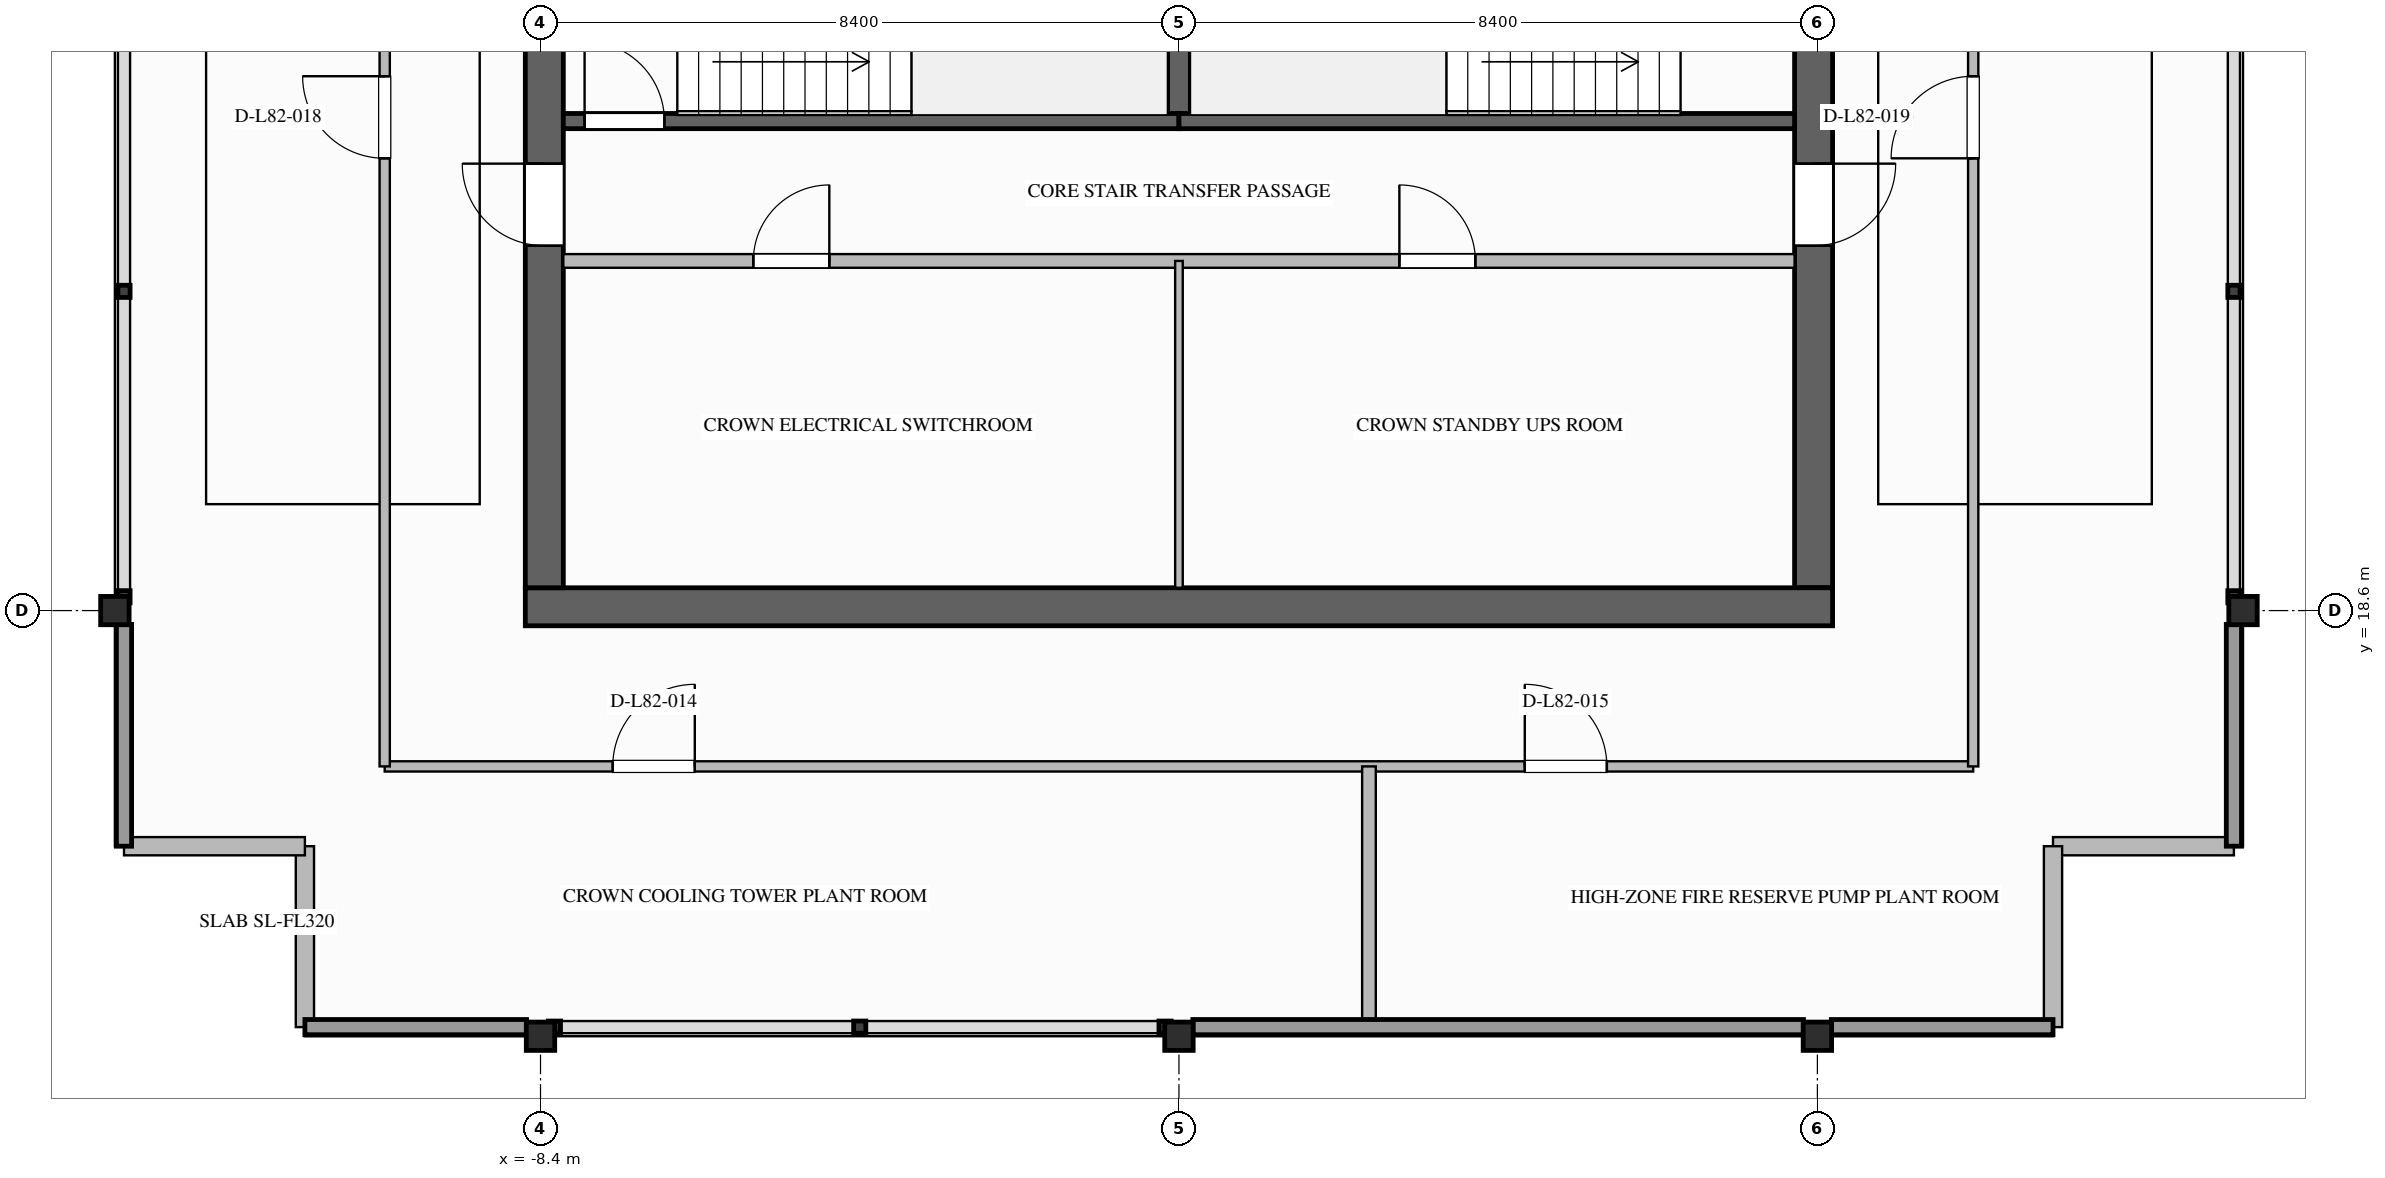
"""IFC4 building model, lengths in metres.
Left out: names, types, materials, properties, quantities, classifications, styles, units other than length and angle.
Written with IfcOpenShell. Run it as: python <this file> out.ifc"""

import sys

from ifc_helpers import new_model, si_unit, direction, frame, frame_2d, origin, origin_2d, place, context, subcontext, project, spatial, rectangle, i_section, extrude, element, fill, save


model = new_model("IFC4")
c1 = context("Model", 3, precision=1e-05, world=origin(), true_north=direction((0.0, 1.0)))
c2 = subcontext(c1, "Body", "Model", "MODEL_VIEW")
j1 = project(units=[si_unit("LENGTHUNIT", "METRE"), si_unit("PLANEANGLEUNIT", "RADIAN")], contexts=[c1])
p1 = place(None, origin())
s1 = spatial("IfcSite", under=j1, at=p1, CompositionType="ELEMENT")
p2 = place(p1, origin())
s2 = spatial("IfcBuilding", under=s1, at=p2, CompositionType="ELEMENT")
p3 = place(p2, frame((0.0, 0.0, 315.4)))
s3 = spatial("IfcBuildingStorey", under=s2, at=p3, CompositionType="ELEMENT", Elevation=315.4)
p4 = place(p3, frame((8.35, 35.1, 0.0), z_axis=(0.0, 0.0, 1.0), x_axis=(0.0, -1.0, 0.0)))
e1 = element("IfcWall", 1, at=p4, inside=s3, PredefinedType="SHEAR", context=c2, shape_type="SweptSolid", body=[
    extrude(rectangle(XDim=16.2, YDim=0.5, at=frame_2d((8.1, 0.0))), origin(), (0.0, 0.0, 1.0), 4.0),
])
p5 = place(p4, frame((3.08, 0.0, 0.0)))
e2 = element("IfcOpeningElement", 2, at=p5, cuts=e1, PredefinedType="OPENING", context=c2, shape_type="SweptSolid", body=[
    extrude(rectangle(XDim=1.12, YDim=2.1, at=frame_2d((0.56, 1.05))), frame((0.0, 0.26, 0.0), z_axis=(0.0, -1.0, 0.0), x_axis=(1.0, 0.0, 0.0)), (0.0, 0.0, 1.0), 0.52),
])
p6 = place(p4, frame((10.62, 0.0, 0.0)))
e3 = element("IfcOpeningElement", 3, at=p6, cuts=e1, PredefinedType="OPENING", context=c2, shape_type="SweptSolid", body=[
    extrude(rectangle(XDim=1.08, YDim=2.04, at=frame_2d((0.54, 1.02))), frame((0.0, 0.26, 0.0), z_axis=(0.0, -1.0, 0.0), x_axis=(1.0, 0.0, 0.0)), (0.0, 0.0, 1.0), 0.52),
])
p7 = place(p3, frame((8.6, 18.65, 0.0), z_axis=(0.0, 0.0, 1.0), x_axis=(-1.0, 0.0, 0.0)))
e4 = element("IfcWall", 4, at=p7, inside=s3, PredefinedType="SHEAR", context=c2, shape_type="SweptSolid", body=[
    extrude(rectangle(XDim=17.2, YDim=0.5, at=frame_2d((8.6, 0.0))), origin(), (0.0, 0.0, 1.0), 4.0),
])
p8 = place(p3, frame((-8.35, 18.9, 0.0), z_axis=(0.0, 0.0, 1.0), x_axis=(0.0, 1.0, 0.0)))
e5 = element("IfcWall", 5, at=p8, inside=s3, PredefinedType="SHEAR", context=c2, shape_type="SweptSolid", body=[
    extrude(rectangle(XDim=16.2, YDim=0.5, at=frame_2d((8.1, 0.0))), origin(), (0.0, 0.0, 1.0), 4.0),
])
p9 = place(p8, frame((4.5, 0.0, 0.0)))
e6 = element("IfcOpeningElement", 6, at=p9, cuts=e5, PredefinedType="OPENING", context=c2, shape_type="SweptSolid", body=[
    extrude(rectangle(XDim=1.08, YDim=2.04, at=frame_2d((0.54, 1.02))), frame((0.0, 0.26, 0.0), z_axis=(0.0, -1.0, 0.0), x_axis=(1.0, 0.0, 0.0)), (0.0, 0.0, 1.0), 0.52),
])
for number, where, z_axis, x_axis in (
    (7, (-14.0, 18.6, 0.0), (0.0, 0.0, 1.0), (1.0, 0.0, 0.0)),
    (8, (14.0, 18.6, 0.0), (0.0, 0.0, 1.0), (1.0, 0.0, 0.0)),
    (9, (-8.4, 13.0, 0.0), (0.0, 0.0, 1.0), (1.0, 0.0, 0.0)),
    (10, (0.0, 13.0, 0.0), (0.0, 0.0, 1.0), (1.0, 0.0, 0.0)),
    (11, (8.4, 13.0, 0.0), (0.0, 0.0, 1.0), (1.0, 0.0, 0.0)),
):
    element("IfcColumn", number, at=place(p3, frame(where, z_axis=z_axis, x_axis=x_axis)), inside=s3, PredefinedType="COLUMN", context=c2, shape_type="SweptSolid", body=[
        extrude(i_section(OverallWidth=0.374, OverallDepth=0.372, WebThickness=0.016, FlangeThickness=0.026, FilletRadius=0.025, at=origin_2d()), origin(), (0.0, 0.0, 1.0), 3.997),
    ])
for number, where, z_axis, x_axis in (
    (12, (-11.5, 13.12, 0.0), (0.0, 0.0, 1.0), (0.0, 1.0, 0.0)),
    (13, (-11.5, 15.5, 0.0), (0.0, 0.0, 1.0), (-1.0, 0.0, 0.0)),
    (14, (13.88, 15.5, 0.0), (0.0, 0.0, 1.0), (-1.0, 0.0, 0.0)),
    (15, (11.5, 15.5, 0.0), (0.0, 0.0, 1.0), (0.0, -1.0, 0.0)),
):
    element("IfcWall", number, at=place(p3, frame(where, z_axis=z_axis, x_axis=x_axis)), inside=s3, PredefinedType="STANDARD", context=c2, shape_type="SweptSolid", body=[
        extrude(rectangle(XDim=2.38, YDim=0.24, at=frame_2d((1.19, 0.0))), origin(), (0.0, 0.0, 1.0), 3.68),
    ])
p10 = place(p3, frame((0.0, 25.04, 0.0), z_axis=(0.0, 0.0, 1.0), x_axis=(0.0, 1.0, 0.0)))
e16 = element("IfcWall", 16, at=p10, inside=s3, PredefinedType="SOLIDWALL", context=c2, shape_type="SweptSolid", body=[
    extrude(rectangle(XDim=3.12, YDim=0.3, at=frame_2d((1.56, 0.0))), origin(), (0.0, 0.0, 1.0), 3.68),
])
p11 = place(p3, frame((-8.1, 25.04, 0.0), z_axis=(0.0, 0.0, 1.0), x_axis=(1.0, 0.0, 0.0)))
e17 = element("IfcWall", 17, at=p11, inside=s3, PredefinedType="SOLIDWALL", context=c2, shape_type="SweptSolid", body=[
    extrude(rectangle(XDim=8.1, YDim=0.2, at=frame_2d((4.05, 0.0))), origin(), (0.0, 0.0, 1.0), 3.68),
])
p12 = place(p11, frame((0.28, 0.0, 0.0)))
e18 = element("IfcOpeningElement", 18, at=p12, cuts=e17, PredefinedType="OPENING", context=c2, shape_type="SweptSolid", body=[
    extrude(rectangle(XDim=1.05, YDim=2.1, at=frame_2d((0.525, 1.05))), frame((0.0, 0.11, 0.0), z_axis=(0.0, -1.0, 0.0), x_axis=(1.0, 0.0, 0.0)), (0.0, 0.0, 1.0), 0.22),
])
p13 = place(p3, frame((0.0, 25.04, 0.0), z_axis=(0.0, 0.0, 1.0), x_axis=(1.0, 0.0, 0.0)))
e19 = element("IfcWall", 19, at=p13, inside=s3, PredefinedType="SOLIDWALL", context=c2, shape_type="SweptSolid", body=[
    extrude(rectangle(XDim=8.1, YDim=0.2, at=frame_2d((4.05, 0.0))), origin(), (0.0, 0.0, 1.0), 3.68),
])
p14 = place(p3, frame((-8.1, 23.2, 0.0), z_axis=(0.0, 0.0, 1.0), x_axis=(1.0, 0.0, 0.0)))
e20 = element("IfcWall", 20, at=p14, inside=s3, PredefinedType="SOLIDWALL", context=c2, shape_type="SweptSolid", body=[
    extrude(rectangle(XDim=16.2, YDim=0.18, at=frame_2d((8.1, 0.0))), origin(), (0.0, 0.0, 1.0), 3.68),
])
p15 = place(p14, frame((2.5, 0.0, 0.0)))
e21 = element("IfcOpeningElement", 21, at=p15, cuts=e20, PredefinedType="OPENING", context=c2, shape_type="SweptSolid", body=[
    extrude(rectangle(XDim=1.0, YDim=2.1, at=frame_2d((0.5, 1.05))), frame((0.0, 0.1, 0.0), z_axis=(0.0, -1.0, 0.0), x_axis=(1.0, 0.0, 0.0)), (0.0, 0.0, 1.0), 0.2),
])
p16 = place(p14, frame((11.0, 0.0, 0.0)))
e22 = element("IfcOpeningElement", 22, at=p16, cuts=e20, PredefinedType="OPENING", context=c2, shape_type="SweptSolid", body=[
    extrude(rectangle(XDim=1.0, YDim=2.1, at=frame_2d((0.5, 1.05))), frame((0.0, 0.1, 0.0), z_axis=(0.0, -1.0, 0.0), x_axis=(1.0, 0.0, 0.0)), (0.0, 0.0, 1.0), 0.2),
])
p17 = place(p3, frame((0.0, 18.9, 0.0), z_axis=(0.0, 0.0, 1.0), x_axis=(0.0, 1.0, 0.0)))
e23 = element("IfcWall", 23, at=p17, inside=s3, PredefinedType="PARTITIONING", context=c2, shape_type="SweptSolid", body=[
    extrude(rectangle(XDim=4.3, YDim=0.1, at=frame_2d((2.15, 0.0))), origin(), (0.0, 0.0, 1.0), 3.68),
])
p18 = place(p3, frame((-10.45, 16.55, 0.0), z_axis=(0.0, 0.0, 1.0), x_axis=(1.0, 0.0, 0.0)))
e24 = element("IfcWall", 24, at=p18, inside=s3, PredefinedType="PARTITIONING", context=c2, shape_type="SweptSolid", body=[
    extrude(rectangle(XDim=20.9, YDim=0.135, at=frame_2d((10.45, 0.0))), origin(), (0.0, 0.0, 1.0), 3.68),
])
p19 = place(p18, frame((3.0, 0.0, 0.0)))
e25 = element("IfcOpeningElement", 25, at=p19, cuts=e24, PredefinedType="OPENING", context=c2, shape_type="SweptSolid", body=[
    extrude(rectangle(XDim=1.08, YDim=2.04, at=frame_2d((0.54, 1.02))), frame((0.0, 0.077, 0.0), z_axis=(0.0, -1.0, 0.0), x_axis=(1.0, 0.0, 0.0)), (0.0, 0.0, 1.0), 0.155),
])
p20 = place(p18, frame((15.0, 0.0, 0.0)))
e26 = element("IfcOpeningElement", 26, at=p20, cuts=e24, PredefinedType="OPENING", context=c2, shape_type="SweptSolid", body=[
    extrude(rectangle(XDim=1.08, YDim=2.04, at=frame_2d((0.54, 1.02))), frame((0.0, 0.077, 0.0), z_axis=(0.0, -1.0, 0.0), x_axis=(1.0, 0.0, 0.0)), (0.0, 0.0, 1.0), 0.155),
])
p21 = place(p3, frame((-10.45, 16.55, 0.0), z_axis=(0.0, 0.0, 1.0), x_axis=(0.0, 1.0, 0.0)))
e27 = element("IfcWall", 27, at=p21, inside=s3, PredefinedType="PARTITIONING", context=c2, shape_type="SweptSolid", body=[
    extrude(rectangle(XDim=20.9, YDim=0.135, at=frame_2d((10.45, 0.0))), origin(), (0.0, 0.0, 1.0), 3.68),
])
p22 = place(p21, frame((8.0, 0.0, 0.0)))
e28 = element("IfcOpeningElement", 28, at=p22, cuts=e27, PredefinedType="OPENING", context=c2, shape_type="SweptSolid", body=[
    extrude(rectangle(XDim=1.08, YDim=2.04, at=frame_2d((0.54, 1.02))), frame((0.0, 0.077, 0.0), z_axis=(0.0, -1.0, 0.0), x_axis=(1.0, 0.0, 0.0)), (0.0, 0.0, 1.0), 0.155),
])
p23 = place(p3, frame((10.45, 16.55, 0.0), z_axis=(0.0, 0.0, 1.0), x_axis=(0.0, 1.0, 0.0)))
e29 = element("IfcWall", 29, at=p23, inside=s3, PredefinedType="PARTITIONING", context=c2, shape_type="SweptSolid", body=[
    extrude(rectangle(XDim=20.9, YDim=0.135, at=frame_2d((10.45, 0.0))), origin(), (0.0, 0.0, 1.0), 3.68),
])
p24 = place(p23, frame((8.0, 0.0, 0.0)))
e30 = element("IfcOpeningElement", 30, at=p24, cuts=e29, PredefinedType="OPENING", context=c2, shape_type="SweptSolid", body=[
    extrude(rectangle(XDim=1.08, YDim=2.04, at=frame_2d((0.54, 1.02))), frame((0.0, 0.077, 0.0), z_axis=(0.0, -1.0, 0.0), x_axis=(1.0, 0.0, 0.0)), (0.0, 0.0, 1.0), 0.155),
])
p25 = place(p3, frame((2.5, 13.12, 0.0), z_axis=(0.0, 0.0, 1.0), x_axis=(0.0, 1.0, 0.0)))
e31 = element("IfcWall", 31, at=p25, inside=s3, PredefinedType="SOLIDWALL", context=c2, shape_type="SweptSolid", body=[
    extrude(rectangle(XDim=3.43, YDim=0.18, at=frame_2d((1.715, 0.0))), origin(), (0.0, 0.0, 1.0), 3.68),
])
p26 = place(p12, origin())
e32 = element("IfcDoor", 32, at=p26, inside=s3, OperationType="SINGLE_SWING_LEFT", PredefinedType="DOOR", context=c2, shape_type="SweptSolid", body=[
    extrude(rectangle(XDim=1.05, YDim=2.1, at=frame_2d((0.525, 1.05))), frame((0.0, 0.025, 0.0), z_axis=(0.0, -1.0, 0.0), x_axis=(1.0, 0.0, 0.0)), (0.0, 0.0, 1.0), 0.05),
])
fill(e18, e32)
p27 = place(p9, origin())
e33 = element("IfcDoor", 33, at=p27, inside=s3, OperationType="SINGLE_SWING_RIGHT", PredefinedType="DOOR", context=c2, shape_type="SweptSolid", body=[
    extrude(rectangle(XDim=1.08, YDim=2.04, at=frame_2d((0.54, 1.02))), frame((0.0, 0.025, 0.0), z_axis=(0.0, -1.0, 0.0), x_axis=(1.0, 0.0, 0.0)), (0.0, 0.0, 1.0), 0.05),
])
fill(e6, e33)
p28 = place(p6, origin())
e34 = element("IfcDoor", 34, at=p28, inside=s3, OperationType="SINGLE_SWING_LEFT", PredefinedType="DOOR", context=c2, shape_type="SweptSolid", body=[
    extrude(rectangle(XDim=1.08, YDim=2.04, at=frame_2d((0.54, 1.02))), frame((0.0, 0.025, 0.0), z_axis=(0.0, -1.0, 0.0), x_axis=(1.0, 0.0, 0.0)), (0.0, 0.0, 1.0), 0.05),
])
fill(e3, e34)
p29 = place(p15, origin())
e35 = element("IfcDoor", 35, at=p29, inside=s3, OperationType="SINGLE_SWING_RIGHT", PredefinedType="DOOR", context=c2, shape_type="SweptSolid", body=[
    extrude(rectangle(XDim=1.0, YDim=2.1, at=frame_2d((0.5, 1.05))), frame((0.0, 0.025, 0.0), z_axis=(0.0, -1.0, 0.0), x_axis=(1.0, 0.0, 0.0)), (0.0, 0.0, 1.0), 0.05),
])
fill(e21, e35)
p30 = place(p16, origin())
e36 = element("IfcDoor", 36, at=p30, inside=s3, OperationType="SINGLE_SWING_LEFT", PredefinedType="DOOR", context=c2, shape_type="SweptSolid", body=[
    extrude(rectangle(XDim=1.0, YDim=2.1, at=frame_2d((0.5, 1.05))), frame((0.0, 0.025, 0.0), z_axis=(0.0, -1.0, 0.0), x_axis=(1.0, 0.0, 0.0)), (0.0, 0.0, 1.0), 0.05),
])
fill(e22, e36)
p31 = place(p19, origin())
e37 = element("IfcDoor", 37, at=p31, inside=s3, OperationType="SINGLE_SWING_RIGHT", PredefinedType="DOOR", context=c2, shape_type="SweptSolid", body=[
    extrude(rectangle(XDim=1.08, YDim=2.04, at=frame_2d((0.54, 1.02))), frame((0.0, 0.025, 0.0), z_axis=(0.0, -1.0, 0.0), x_axis=(1.0, 0.0, 0.0)), (0.0, 0.0, 1.0), 0.05),
])
fill(e25, e37)
p32 = place(p20, origin())
e38 = element("IfcDoor", 38, at=p32, inside=s3, OperationType="SINGLE_SWING_LEFT", PredefinedType="DOOR", context=c2, shape_type="SweptSolid", body=[
    extrude(rectangle(XDim=1.08, YDim=2.04, at=frame_2d((0.54, 1.02))), frame((0.0, 0.025, 0.0), z_axis=(0.0, -1.0, 0.0), x_axis=(1.0, 0.0, 0.0)), (0.0, 0.0, 1.0), 0.05),
])
fill(e26, e38)
p33 = place(p22, origin())
e39 = element("IfcDoor", 39, at=p33, inside=s3, OperationType="SINGLE_SWING_RIGHT", PredefinedType="DOOR", context=c2, shape_type="SweptSolid", body=[
    extrude(rectangle(XDim=1.08, YDim=2.04, at=frame_2d((0.54, 1.02))), frame((0.0, 0.025, 0.0), z_axis=(0.0, -1.0, 0.0), x_axis=(1.0, 0.0, 0.0)), (0.0, 0.0, 1.0), 0.05),
])
fill(e28, e39)
p34 = place(p24, origin())
e40 = element("IfcDoor", 40, at=p34, inside=s3, OperationType="SINGLE_SWING_LEFT", PredefinedType="DOOR", context=c2, shape_type="SweptSolid", body=[
    extrude(rectangle(XDim=1.08, YDim=2.04, at=frame_2d((0.54, 1.02))), frame((0.0, 0.025, 0.0), z_axis=(0.0, -1.0, 0.0), x_axis=(1.0, 0.0, 0.0)), (0.0, 0.0, 1.0), 0.05),
])
fill(e30, e40)
save(model, sys.argv[1])
